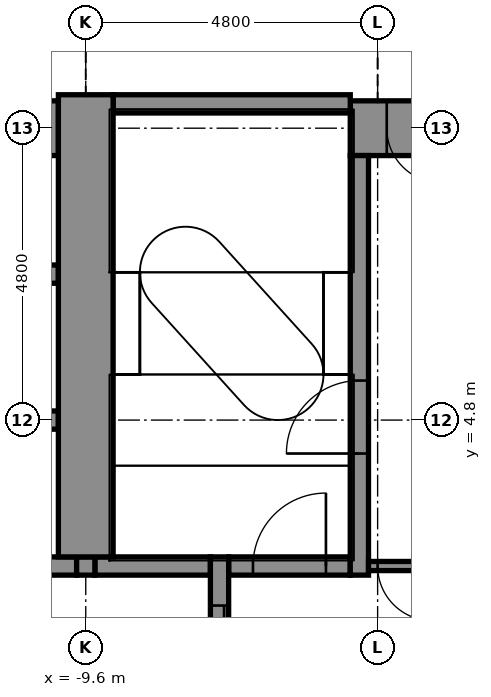
"""IFC4 building model, lengths in metres.
Left out: names, types, materials, properties, quantities, classifications, styles, units other than length and angle.
Written with IfcOpenShell. Run it as: python <this file> out.ifc"""

import sys

from ifc_helpers import new_model, si_unit, direction, frame, frame_2d, origin, place, context, subcontext, project, spatial, rectangle, extrude, element, fill, save


model = new_model("IFC4")
c1 = context("Model", 3, precision=1e-05, world=origin(), true_north=direction((0.0, 1.0)))
c2 = subcontext(c1, "Body", "Model", "MODEL_VIEW")
j1 = project(units=[si_unit("LENGTHUNIT", "METRE"), si_unit("PLANEANGLEUNIT", "RADIAN")], contexts=[c1])
p1 = place(None, origin())
s1 = spatial("IfcSite", under=j1, at=p1, CompositionType="ELEMENT")
p2 = place(p1, origin())
s2 = spatial("IfcBuilding", under=s1, at=p2, CompositionType="ELEMENT")
p3 = place(p2, frame((0.0, 0.0, 113.9)))
s3 = spatial("IfcBuildingStorey", under=s2, at=p3, CompositionType="ELEMENT", Elevation=113.9)
p4 = place(p3, frame((-10.85, 2.4, -0.2), z_axis=(0.0, 0.0, 1.0), x_axis=(1.0, 0.0, 0.0)))
e1 = element("IfcWall", 1, at=p4, inside=s3, PredefinedType="STANDARD", context=c2, shape_type="SweptSolid", body=[
    extrude(rectangle(XDim=1.1, YDim=0.3, at=frame_2d((0.55, 0.0))), origin(), (0.0, 0.0, 1.0), 4.5),
])
p5 = place(p3, frame((-9.45, 2.4, -0.2), z_axis=(0.0, 0.0, 1.0), x_axis=(1.0, 0.0, 0.0)))
e2 = element("IfcWall", 2, at=p5, inside=s3, PredefinedType="STANDARD", context=c2, shape_type="SweptSolid", body=[
    extrude(rectangle(XDim=1.9, YDim=0.3, at=frame_2d((0.95, 0.0))), origin(), (0.0, 0.0, 1.0), 4.5),
])
p6 = place(p3, frame((-7.25, 2.4, -0.2), z_axis=(0.0, 0.0, 1.0), x_axis=(1.0, 0.0, 0.0)))
e3 = element("IfcWall", 3, at=p6, inside=s3, PredefinedType="STANDARD", context=c2, shape_type="SweptSolid", body=[
    extrude(rectangle(XDim=2.0, YDim=0.3, at=frame_2d((1.0, 0.0))), origin(), (0.0, 0.0, 1.0), 4.5),
])
p7 = place(p6, frame((0.4, 0.0, 0.2)))
e4 = element("IfcOpeningElement", 4, at=p7, cuts=e3, PredefinedType="OPENING", context=c2, shape_type="SweptSolid", body=[
    extrude(rectangle(XDim=1.2, YDim=2.1, at=frame_2d((0.6, 1.05))), frame((0.0, 0.16, 0.0), z_axis=(0.0, -1.0, 0.0), x_axis=(1.0, 0.0, 0.0)), (0.0, 0.0, 1.0), 0.32),
])
for number, where, z_axis, x_axis in (
    (5, (-13.95, 4.8, -0.2), (0.0, 0.0, 1.0), (1.0, 0.0, 0.0)),
    (6, (-13.95, 7.2, -0.2), (0.0, 0.0, 1.0), (1.0, 0.0, 0.0)),
):
    element("IfcWall", number, at=place(p3, frame(where, z_axis=z_axis, x_axis=x_axis)), inside=s3, PredefinedType="STANDARD", context=c2, shape_type="SweptSolid", body=[
        extrude(rectangle(XDim=3.9, YDim=0.3, at=frame_2d((1.95, 0.0))), origin(), (0.0, 0.0, 1.0), 4.5),
    ])
p8 = place(p3, frame((-13.95, 9.6, -0.2), z_axis=(0.0, 0.0, 1.0), x_axis=(1.0, 0.0, 0.0)))
e7 = element("IfcWall", 7, at=p8, inside=s3, PredefinedType="SHEAR", context=c2, shape_type="SweptSolid", body=[
    extrude(rectangle(XDim=3.9, YDim=0.9, at=frame_2d((1.95, 0.0))), origin(), (0.0, 0.0, 1.0), 4.5),
])
p9 = place(p8, frame((0.05, 0.0, 0.2)))
e8 = element("IfcOpeningElement", 8, at=p9, cuts=e7, PredefinedType="OPENING", context=c2, shape_type="SweptSolid", body=[
    extrude(rectangle(XDim=0.9, YDim=2.1, at=frame_2d((0.45, 1.05))), frame((0.0, 0.46, 0.0), z_axis=(0.0, -1.0, 0.0), x_axis=(1.0, 0.0, 0.0)), (0.0, 0.0, 1.0), 0.92),
])
p10 = place(p8, frame((2.3, 0.0, 0.2)))
e9 = element("IfcOpeningElement", 9, at=p10, cuts=e7, PredefinedType="OPENING", context=c2, shape_type="SweptSolid", body=[
    extrude(rectangle(XDim=0.9, YDim=2.1, at=frame_2d((0.45, 1.05))), frame((0.0, 0.46, 0.0), z_axis=(0.0, -1.0, 0.0), x_axis=(1.0, 0.0, 0.0)), (0.0, 0.0, 1.0), 0.92),
])
p11 = place(p3, frame((-5.25, 9.6, -0.2), z_axis=(0.0, 0.0, 1.0), x_axis=(1.0, 0.0, 0.0)))
e10 = element("IfcWall", 10, at=p11, inside=s3, PredefinedType="SHEAR", context=c2, shape_type="SweptSolid", body=[
    extrude(rectangle(XDim=14.4, YDim=0.9, at=frame_2d((7.2, 0.0))), origin(), (0.0, 0.0, 1.0), 4.5),
])
p12 = place(p11, frame((0.6, 0.0, 0.2)))
e11 = element("IfcOpeningElement", 11, at=p12, cuts=e10, PredefinedType="OPENING", context=c2, shape_type="SweptSolid", body=[
    extrude(rectangle(XDim=0.9, YDim=2.1, at=frame_2d((0.45, 1.05))), frame((0.0, 0.46, 0.0), z_axis=(0.0, -1.0, 0.0), x_axis=(1.0, 0.0, 0.0)), (0.0, 0.0, 1.0), 0.92),
])
p13 = place(p3, frame((-9.15, 10.0, -0.2), z_axis=(0.0, 0.0, 1.0), x_axis=(1.0, 0.0, 0.0)))
e12 = element("IfcWall", 12, at=p13, inside=s3, PredefinedType="STANDARD", context=c2, shape_type="SweptSolid", body=[
    extrude(rectangle(XDim=3.9, YDim=0.3, at=frame_2d((1.95, 0.0))), origin(), (0.0, 0.0, 1.0), 4.5),
])
p14 = place(p3, frame((-9.6, 2.25, -0.2), z_axis=(0.0, 0.0, 1.0), x_axis=(0.0, 1.0, 0.0)))
e13 = element("IfcWall", 13, at=p14, inside=s3, PredefinedType="STANDARD", context=c2, shape_type="SweptSolid", body=[
    extrude(rectangle(XDim=0.3, YDim=0.3, at=frame_2d((0.15, 0.0))), origin(), (0.0, 0.0, 1.0), 4.5),
])
p15 = place(p3, frame((-9.6, 2.55, -0.2), z_axis=(0.0, 0.0, 1.0), x_axis=(0.0, 1.0, 0.0)))
e14 = element("IfcWall", 14, at=p15, inside=s3, PredefinedType="SHEAR", context=c2, shape_type="SweptSolid", body=[
    extrude(rectangle(XDim=7.6, YDim=0.9, at=frame_2d((3.8, 0.0))), origin(), (0.0, 0.0, 1.0), 4.5),
])
p16 = place(p3, frame((-7.4, -2.55, -0.2), z_axis=(0.0, 0.0, 1.0), x_axis=(0.0, 1.0, 0.0)))
e15 = element("IfcWall", 15, at=p16, inside=s3, PredefinedType="STANDARD", context=c2, shape_type="SweptSolid", body=[
    extrude(rectangle(XDim=5.1, YDim=0.3, at=frame_2d((2.55, 0.0))), origin(), (0.0, 0.0, 1.0), 4.5),
])
p17 = place(p16, frame((0.8, 0.0, 0.2)))
e16 = element("IfcOpeningElement", 16, at=p17, cuts=e15, PredefinedType="OPENING", context=c2, shape_type="SweptSolid", body=[
    extrude(rectangle(XDim=1.1, YDim=2.1, at=frame_2d((0.55, 1.05))), frame((0.0, 0.16, 0.0), z_axis=(0.0, -1.0, 0.0), x_axis=(1.0, 0.0, 0.0)), (0.0, 0.0, 1.0), 0.32),
])
p18 = place(p16, frame((3.2, 0.0, 0.2)))
e17 = element("IfcOpeningElement", 17, at=p18, cuts=e15, PredefinedType="OPENING", context=c2, shape_type="SweptSolid", body=[
    extrude(rectangle(XDim=1.1, YDim=2.1, at=frame_2d((0.55, 1.05))), frame((0.0, 0.16, 0.0), z_axis=(0.0, -1.0, 0.0), x_axis=(1.0, 0.0, 0.0)), (0.0, 0.0, 1.0), 0.32),
])
p19 = place(p3, frame((-5.1, 2.25, -0.2), z_axis=(0.0, 0.0, 1.0), x_axis=(0.0, 1.0, 0.0)))
e18 = element("IfcWall", 18, at=p19, inside=s3, PredefinedType="STANDARD", context=c2, shape_type="SweptSolid", body=[
    extrude(rectangle(XDim=6.9, YDim=0.3, at=frame_2d((3.45, 0.0))), origin(), (0.0, 0.0, 1.0), 4.5),
])
p20 = place(p19, frame((2.0, 0.0, 0.2)))
e19 = element("IfcOpeningElement", 19, at=p20, cuts=e18, PredefinedType="OPENING", context=c2, shape_type="SweptSolid", body=[
    extrude(rectangle(XDim=1.2, YDim=2.1, at=frame_2d((0.6, 1.05))), frame((0.0, 0.16, 0.0), z_axis=(0.0, -1.0, 0.0), x_axis=(1.0, 0.0, 0.0)), (0.0, 0.0, 1.0), 0.32),
])
p21 = place(p3, frame((-4.95, 2.4, 0.0), z_axis=(0.0, 0.0, 1.0), x_axis=(1.0, 0.0, 0.0)))
e20 = element("IfcWall", 20, at=p21, inside=s3, PredefinedType="PARTITIONING", context=c2, shape_type="SweptSolid", body=[
    extrude(rectangle(XDim=1.2, YDim=0.15, at=frame_2d((0.6, 0.0))), origin(), (0.0, 0.0, 1.0), 4.3),
])
p22 = place(p21, frame((0.15, 0.0, 0.0)))
e21 = element("IfcOpeningElement", 21, at=p22, cuts=e20, PredefinedType="OPENING", context=c2, shape_type="SweptSolid", body=[
    extrude(rectangle(XDim=0.9, YDim=2.1, at=frame_2d((0.45, 1.05))), frame((0.0, 0.085, 0.0), z_axis=(0.0, -1.0, 0.0), x_axis=(1.0, 0.0, 0.0)), (0.0, 0.0, 1.0), 0.17),
])
p23 = place(p18, origin())
e22 = element("IfcDoor", 22, at=p23, inside=s3, OperationType="DOUBLE_DOOR_SLIDING", PredefinedType="DOOR", context=c2, shape_type="SweptSolid", body=[
    extrude(rectangle(XDim=1.1, YDim=2.1, at=frame_2d((0.55, 1.05))), frame((0.0, 0.025, 0.0), z_axis=(0.0, -1.0, 0.0), x_axis=(1.0, 0.0, 0.0)), (0.0, 0.0, 1.0), 0.05),
])
fill(e17, e22)
p24 = place(p20, origin())
e23 = element("IfcDoor", 23, at=p24, inside=s3, OperationType="SINGLE_SWING_LEFT", PredefinedType="DOOR", context=c2, shape_type="SweptSolid", body=[
    extrude(rectangle(XDim=1.2, YDim=2.1, at=frame_2d((0.6, 1.05))), frame((0.0, 0.025, 0.0), z_axis=(0.0, -1.0, 0.0), x_axis=(1.0, 0.0, 0.0)), (0.0, 0.0, 1.0), 0.05),
])
fill(e19, e23)
p25 = place(p12, frame((0.9, 0.0, 0.0), z_axis=(0.0, 0.0, 1.0), x_axis=(-1.0, 0.0, 0.0)))
e24 = element("IfcDoor", 24, at=p25, inside=s3, OperationType="SINGLE_SWING_RIGHT", PredefinedType="DOOR", context=c2, shape_type="SweptSolid", body=[
    extrude(rectangle(XDim=0.9, YDim=2.1, at=frame_2d((0.45, 1.05))), frame((0.0, 0.025, 0.0), z_axis=(0.0, -1.0, 0.0), x_axis=(1.0, 0.0, 0.0)), (0.0, 0.0, 1.0), 0.05),
])
fill(e11, e24)
p26 = place(p22, frame((0.9, 0.0, 0.0), z_axis=(0.0, 0.0, 1.0), x_axis=(-1.0, 0.0, 0.0)))
e25 = element("IfcDoor", 25, at=p26, inside=s3, OperationType="SINGLE_SWING_RIGHT", PredefinedType="DOOR", context=c2, shape_type="SweptSolid", body=[
    extrude(rectangle(XDim=0.9, YDim=2.1, at=frame_2d((0.45, 1.05))), frame((0.0, 0.025, 0.0), z_axis=(0.0, -1.0, 0.0), x_axis=(1.0, 0.0, 0.0)), (0.0, 0.0, 1.0), 0.05),
])
fill(e21, e25)
p27 = place(p7, origin())
e26 = element("IfcDoor", 26, at=p27, inside=s3, OperationType="SINGLE_SWING_RIGHT", PredefinedType="DOOR", context=c2, shape_type="SweptSolid", body=[
    extrude(rectangle(XDim=1.2, YDim=2.1, at=frame_2d((0.6, 1.05))), frame((0.0, 0.025, 0.0), z_axis=(0.0, -1.0, 0.0), x_axis=(1.0, 0.0, 0.0)), (0.0, 0.0, 1.0), 0.05),
])
fill(e4, e26)
save(model, sys.argv[1])
